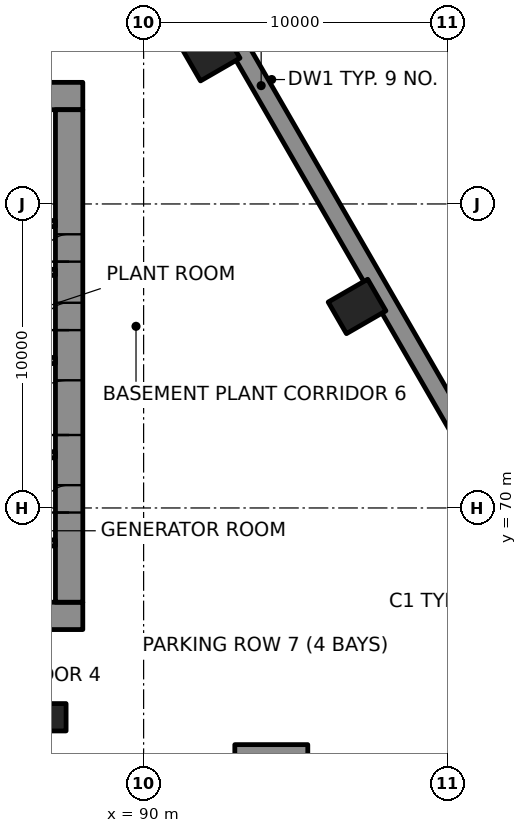
"""IFC4 building model, lengths in metres.
Left out: names, types, materials, properties, quantities, classifications, styles, units other than length and angle.
Written with IfcOpenShell. Run it as: python <this file> out.ifc"""

import sys

from ifc_helpers import new_model, si_unit, direction, frame, frame_2d, origin, origin_2d, place, context, subcontext, project, spatial, polyline, rectangle, outline, extrude, element, fill, save


model = new_model("IFC4")
c1 = context("Model", 3, precision=1e-05, world=origin(), true_north=direction((0.0, 1.0)))
c2 = subcontext(c1, "Body", "Model", "MODEL_VIEW")
j1 = project(units=[si_unit("LENGTHUNIT", "METRE"), si_unit("PLANEANGLEUNIT", "RADIAN")], contexts=[c1])
p1 = place(None, origin())
s1 = spatial("IfcSite", under=j1, at=p1, CompositionType="ELEMENT")
p2 = place(p1, origin())
s2 = spatial("IfcBuilding", under=s1, at=p2, CompositionType="ELEMENT")
p3 = place(p2, frame((0.0, 0.0, -14.0)))
s3 = spatial("IfcBuildingStorey", under=s2, at=p3, CompositionType="ELEMENT", Elevation=-14.0)
p4 = place(p3, frame((109.132, 57.451, -0.35), z_axis=(0.0, 0.0, 1.0), x_axis=(-0.499999206999, 0.866025861623, 0.0)))
e1 = element("IfcWall", 1, at=p4, inside=s3, PredefinedType="SOLIDWALL", context=c2, shape_type="SweptSolid", body=[
    extrude(rectangle(XDim=61.064, YDim=0.6, at=frame_2d((30.532, 0.0))), origin(), (0.0, 0.0, 1.0), 4.5),
])
p5 = place(p3, frame((0.0, 0.0, -14.5)))
e2 = element("IfcWall", 2, at=p5, inside=s3, PredefinedType="SOLIDWALL", context=c2, shape_type="SweptSolid", body=[
    extrude(outline(polyline([(109.132, 57.451), (78.6, 110.334), (79.062, 111.134), (110.056, 57.451), (109.132, 57.451)])), origin(), (0.0, 0.0, 1.0), 14.15),
])
p6 = place(p3, frame((94.2, 54.215, -0.35), z_axis=(0.0, 0.0, 1.0), x_axis=(0.0, 1.0, 0.0)))
e3 = element("IfcWall", 3, at=p6, inside=s3, PredefinedType="SHEAR", context=c2, shape_type="SweptSolid", body=[
    extrude(rectangle(XDim=8.0, YDim=2.4, at=frame_2d((4.0, 0.0))), origin(), (0.0, 0.0, 1.0), 4.5),
])
for number, where, z_axis, x_axis in (
    (4, (97.021, 76.628, -0.35), (0.0, 0.0, 1.0), (-0.5, 0.866, 0.0)),
    (5, (92.22, 84.942, -0.35), (0.0, 0.0, 1.0), (-0.5, 0.866, 0.0)),
):
    element("IfcColumn", number, at=place(p3, frame(where, z_axis=z_axis, x_axis=x_axis)), inside=s3, PredefinedType="COLUMN", context=c2, shape_type="SweptSolid", body=[
        extrude(rectangle(XDim=1.2, YDim=1.5, at=origin_2d()), origin(), (0.0, 0.0, 1.0), 4.85),
    ])
p7 = place(p3, frame((87.0, 63.115, -0.35), z_axis=(0.0, 0.0, 1.0), x_axis=(1.0, 0.0, 0.0)))
e6 = element("IfcColumn", 6, at=p7, inside=s3, PredefinedType="COLUMN", context=c2, shape_type="SweptSolid", body=[
    extrude(rectangle(XDim=0.9, YDim=0.9, at=origin_2d()), origin(), (0.0, 0.0, 1.0), 4.85),
])
p8 = place(p3, frame((62.0, 66.45, -0.35), z_axis=(0.0, 0.0, 1.0), x_axis=(1.0, 0.0, 0.0)))
e7 = element("IfcWall", 7, at=p8, inside=s3, PredefinedType="SHEAR", context=c2, shape_type="SweptSolid", body=[
    extrude(rectangle(XDim=26.0, YDim=0.9, at=frame_2d((13.0, 0.0))), origin(), (0.0, 0.0, 1.0), 4.5),
])
p9 = place(p8, frame((3.45, 0.0, 0.35)))
e8 = element("IfcOpeningElement", 8, at=p9, cuts=e7, PredefinedType="OPENING", context=c2, shape_type="SweptSolid", body=[
    extrude(rectangle(XDim=0.9, YDim=2.1, at=frame_2d((0.45, 1.05))), frame((0.0, 0.46, 0.0), z_axis=(0.0, -1.0, 0.0), x_axis=(1.0, 0.0, 0.0)), (0.0, 0.0, 1.0), 0.92),
])
p10 = place(p8, frame((5.637, 0.0, 0.35)))
e9 = element("IfcOpeningElement", 9, at=p10, cuts=e7, PredefinedType="OPENING", context=c2, shape_type="SweptSolid", body=[
    extrude(rectangle(XDim=0.9, YDim=2.1, at=frame_2d((0.45, 1.05))), frame((0.0, 0.46, 0.0), z_axis=(0.0, -1.0, 0.0), x_axis=(1.0, 0.0, 0.0)), (0.0, 0.0, 1.0), 0.92),
])
p11 = place(p8, frame((7.212, 0.0, 0.35)))
e10 = element("IfcOpeningElement", 10, at=p11, cuts=e7, PredefinedType="OPENING", context=c2, shape_type="SweptSolid", body=[
    extrude(rectangle(XDim=0.9, YDim=2.1, at=frame_2d((0.45, 1.05))), frame((0.0, 0.46, 0.0), z_axis=(0.0, -1.0, 0.0), x_axis=(1.0, 0.0, 0.0)), (0.0, 0.0, 1.0), 0.92),
])
p12 = place(p8, frame((8.999, 0.0, 0.35)))
e11 = element("IfcOpeningElement", 11, at=p12, cuts=e7, PredefinedType="OPENING", context=c2, shape_type="SweptSolid", body=[
    extrude(rectangle(XDim=0.9, YDim=2.1, at=frame_2d((0.45, 1.05))), frame((0.0, 0.46, 0.0), z_axis=(0.0, -1.0, 0.0), x_axis=(1.0, 0.0, 0.0)), (0.0, 0.0, 1.0), 0.92),
])
p13 = place(p8, frame((17.324, 0.0, 0.35)))
e12 = element("IfcOpeningElement", 12, at=p13, cuts=e7, PredefinedType="OPENING", context=c2, shape_type="SweptSolid", body=[
    extrude(rectangle(XDim=0.9, YDim=2.1, at=frame_2d((0.45, 1.05))), frame((0.0, 0.46, 0.0), z_axis=(0.0, -1.0, 0.0), x_axis=(1.0, 0.0, 0.0)), (0.0, 0.0, 1.0), 0.92),
])
p14 = place(p3, frame((62.0, 83.55, -0.35), z_axis=(0.0, 0.0, 1.0), x_axis=(1.0, 0.0, 0.0)))
e13 = element("IfcWall", 13, at=p14, inside=s3, PredefinedType="SHEAR", context=c2, shape_type="SweptSolid", body=[
    extrude(rectangle(XDim=26.0, YDim=0.9, at=frame_2d((13.0, 0.0))), origin(), (0.0, 0.0, 1.0), 4.5),
])
p15 = place(p14, frame((5.695, 0.0, 0.35)))
e14 = element("IfcOpeningElement", 14, at=p15, cuts=e13, PredefinedType="OPENING", context=c2, shape_type="SweptSolid", body=[
    extrude(rectangle(XDim=1.0, YDim=2.1, at=frame_2d((0.5, 1.05))), frame((0.0, 0.46, 0.0), z_axis=(0.0, -1.0, 0.0), x_axis=(1.0, 0.0, 0.0)), (0.0, 0.0, 1.0), 0.92),
])
p16 = place(p14, frame((19.505, 0.0, 0.35)))
e15 = element("IfcOpeningElement", 15, at=p16, cuts=e13, PredefinedType="OPENING", context=c2, shape_type="SweptSolid", body=[
    extrude(rectangle(XDim=1.0, YDim=2.1, at=frame_2d((0.5, 1.05))), frame((0.0, 0.46, 0.0), z_axis=(0.0, -1.0, 0.0), x_axis=(1.0, 0.0, 0.0)), (0.0, 0.0, 1.0), 0.92),
])
p17 = place(p14, frame((3.45, 0.0, 0.35)))
e16 = element("IfcOpeningElement", 16, at=p17, cuts=e13, PredefinedType="OPENING", context=c2, shape_type="SweptSolid", body=[
    extrude(rectangle(XDim=0.9, YDim=2.1, at=frame_2d((0.45, 1.05))), frame((0.0, 0.46, 0.0), z_axis=(0.0, -1.0, 0.0), x_axis=(1.0, 0.0, 0.0)), (0.0, 0.0, 1.0), 0.92),
])
p18 = place(p14, frame((12.65, 0.0, 0.35)))
e17 = element("IfcOpeningElement", 17, at=p18, cuts=e13, PredefinedType="OPENING", context=c2, shape_type="SweptSolid", body=[
    extrude(rectangle(XDim=0.9, YDim=2.1, at=frame_2d((0.45, 1.05))), frame((0.0, 0.46, 0.0), z_axis=(0.0, -1.0, 0.0), x_axis=(1.0, 0.0, 0.0)), (0.0, 0.0, 1.0), 0.92),
])
p19 = place(p14, frame((22.55, 0.0, 0.35)))
e18 = element("IfcOpeningElement", 18, at=p19, cuts=e13, PredefinedType="OPENING", context=c2, shape_type="SweptSolid", body=[
    extrude(rectangle(XDim=0.9, YDim=2.1, at=frame_2d((0.45, 1.05))), frame((0.0, 0.46, 0.0), z_axis=(0.0, -1.0, 0.0), x_axis=(1.0, 0.0, 0.0)), (0.0, 0.0, 1.0), 0.92),
])
p20 = place(p3, frame((87.55, 66.9, -0.35), z_axis=(0.0, 0.0, 1.0), x_axis=(0.0, 1.0, 0.0)))
e19 = element("IfcWall", 19, at=p20, inside=s3, PredefinedType="SHEAR", context=c2, shape_type="SweptSolid", body=[
    extrude(rectangle(XDim=16.2, YDim=0.9, at=frame_2d((8.1, 0.0))), origin(), (0.0, 0.0, 1.0), 4.5),
])
p21 = place(p20, frame((5.5, 0.0, 0.35)))
e20 = element("IfcOpeningElement", 20, at=p21, cuts=e19, PredefinedType="OPENING", context=c2, shape_type="SweptSolid", body=[
    extrude(rectangle(XDim=1.8, YDim=2.1, at=frame_2d((0.9, 1.05))), frame((0.0, 0.46, 0.0), z_axis=(0.0, -1.0, 0.0), x_axis=(1.0, 0.0, 0.0)), (0.0, 0.0, 1.0), 0.92),
])
p22 = place(p20, frame((2.95, 0.0, 0.35)))
e21 = element("IfcOpeningElement", 21, at=p22, cuts=e19, PredefinedType="OPENING", context=c2, shape_type="SweptSolid", body=[
    extrude(rectangle(XDim=0.9, YDim=2.1, at=frame_2d((0.45, 1.05))), frame((0.0, 0.46, 0.0), z_axis=(0.0, -1.0, 0.0), x_axis=(1.0, 0.0, 0.0)), (0.0, 0.0, 1.0), 0.92),
])
p23 = place(p20, frame((8.95, 0.0, 0.35)))
e22 = element("IfcOpeningElement", 22, at=p23, cuts=e19, PredefinedType="OPENING", context=c2, shape_type="SweptSolid", body=[
    extrude(rectangle(XDim=0.9, YDim=2.1, at=frame_2d((0.45, 1.05))), frame((0.0, 0.46, 0.0), z_axis=(0.0, -1.0, 0.0), x_axis=(1.0, 0.0, 0.0)), (0.0, 0.0, 1.0), 0.92),
])
p24 = place(p20, frame((11.202, 0.0, 0.35)))
e23 = element("IfcOpeningElement", 23, at=p24, cuts=e19, PredefinedType="OPENING", context=c2, shape_type="SweptSolid", body=[
    extrude(rectangle(XDim=0.9, YDim=2.1, at=frame_2d((0.45, 1.05))), frame((0.0, 0.46, 0.0), z_axis=(0.0, -1.0, 0.0), x_axis=(1.0, 0.0, 0.0)), (0.0, 0.0, 1.0), 0.92),
])
p25 = place(p3, frame((73.4, 68.85, 0.0), z_axis=(0.0, 0.0, 1.0), x_axis=(1.0, 0.0, 0.0)))
e24 = element("IfcWall", 24, at=p25, inside=s3, PredefinedType="PARTITIONING", context=c2, shape_type="SweptSolid", body=[
    extrude(rectangle(XDim=13.7, YDim=0.2, at=frame_2d((6.85, 0.0))), origin(), (0.0, 0.0, 1.0), 4.15),
])
p26 = place(p3, frame((73.35, 71.75, 0.0), z_axis=(0.0, 0.0, 1.0), x_axis=(1.0, 0.0, 0.0)))
e25 = element("IfcWall", 25, at=p26, inside=s3, PredefinedType="PARTITIONING", context=c2, shape_type="SweptSolid", body=[
    extrude(rectangle(XDim=13.75, YDim=0.2, at=frame_2d((6.875, 0.0))), origin(), (0.0, 0.0, 1.0), 4.15),
])
p27 = place(p26, frame((2.25, 0.0, 0.0)))
e26 = element("IfcOpeningElement", 26, at=p27, cuts=e25, PredefinedType="OPENING", context=c2, shape_type="SweptSolid", body=[
    extrude(rectangle(XDim=0.9, YDim=2.1, at=frame_2d((0.45, 1.05))), frame((0.0, 0.11, 0.0), z_axis=(0.0, -1.0, 0.0), x_axis=(1.0, 0.0, 0.0)), (0.0, 0.0, 1.0), 0.22),
])
p28 = place(p26, frame((7.85, 0.0, 0.0)))
e27 = element("IfcOpeningElement", 27, at=p28, cuts=e25, PredefinedType="OPENING", context=c2, shape_type="SweptSolid", body=[
    extrude(rectangle(XDim=0.9, YDim=2.1, at=frame_2d((0.45, 1.05))), frame((0.0, 0.11, 0.0), z_axis=(0.0, -1.0, 0.0), x_axis=(1.0, 0.0, 0.0)), (0.0, 0.0, 1.0), 0.22),
])
p29 = place(p3, frame((73.35, 74.85, 0.0), z_axis=(0.0, 0.0, 1.0), x_axis=(1.0, 0.0, 0.0)))
e28 = element("IfcWall", 28, at=p29, inside=s3, PredefinedType="PARTITIONING", context=c2, shape_type="SweptSolid", body=[
    extrude(rectangle(XDim=13.75, YDim=0.2, at=frame_2d((6.875, 0.0))), origin(), (0.0, 0.0, 1.0), 4.15),
])
p30 = place(p29, frame((2.25, 0.0, 0.0)))
e29 = element("IfcOpeningElement", 29, at=p30, cuts=e28, PredefinedType="OPENING", context=c2, shape_type="SweptSolid", body=[
    extrude(rectangle(XDim=0.9, YDim=2.1, at=frame_2d((0.45, 1.05))), frame((0.0, 0.11, 0.0), z_axis=(0.0, -1.0, 0.0), x_axis=(1.0, 0.0, 0.0)), (0.0, 0.0, 1.0), 0.22),
])
p31 = place(p29, frame((7.85, 0.0, 0.0)))
e30 = element("IfcOpeningElement", 30, at=p31, cuts=e28, PredefinedType="OPENING", context=c2, shape_type="SweptSolid", body=[
    extrude(rectangle(XDim=0.9, YDim=2.1, at=frame_2d((0.45, 1.05))), frame((0.0, 0.11, 0.0), z_axis=(0.0, -1.0, 0.0), x_axis=(1.0, 0.0, 0.0)), (0.0, 0.0, 1.0), 0.22),
])
for number, where, z_axis, x_axis in (
    (31, (83.05, 77.75, 0.0), (0.0, 0.0, 1.0), (1.0, 0.0, 0.0)),
    (32, (83.05, 79.355, 0.0), (0.0, 0.0, 1.0), (1.0, 0.0, 0.0)),
):
    element("IfcWall", number, at=place(p3, frame(where, z_axis=z_axis, x_axis=x_axis)), inside=s3, PredefinedType="PARTITIONING", context=c2, shape_type="SweptSolid", body=[
        extrude(rectangle(XDim=4.05, YDim=0.2, at=frame_2d((2.025, 0.0))), origin(), (0.0, 0.0, 1.0), 4.15),
    ])
p32 = place(p21, origin())
e33 = element("IfcDoor", 33, at=p32, inside=s3, OperationType="SINGLE_SWING_RIGHT", PredefinedType="DOOR", context=c2, shape_type="SweptSolid", body=[
    extrude(rectangle(XDim=1.8, YDim=2.1, at=frame_2d((0.9, 1.05))), frame((0.0, 0.17, 0.0), z_axis=(0.0, -1.0, 0.0), x_axis=(1.0, 0.0, 0.0)), (0.0, 0.0, 1.0), 0.34),
])
fill(e20, e33)
p33 = place(p22, origin())
e34 = element("IfcDoor", 34, at=p33, inside=s3, OperationType="SINGLE_SWING_RIGHT", PredefinedType="DOOR", context=c2, shape_type="SweptSolid", body=[
    extrude(rectangle(XDim=0.9, YDim=2.1, at=frame_2d((0.45, 1.05))), frame((0.0, 0.17, 0.0), z_axis=(0.0, -1.0, 0.0), x_axis=(1.0, 0.0, 0.0)), (0.0, 0.0, 1.0), 0.34),
])
fill(e21, e34)
p34 = place(p23, origin())
e35 = element("IfcDoor", 35, at=p34, inside=s3, OperationType="SINGLE_SWING_RIGHT", PredefinedType="DOOR", context=c2, shape_type="SweptSolid", body=[
    extrude(rectangle(XDim=0.9, YDim=2.1, at=frame_2d((0.45, 1.05))), frame((0.0, 0.17, 0.0), z_axis=(0.0, -1.0, 0.0), x_axis=(1.0, 0.0, 0.0)), (0.0, 0.0, 1.0), 0.34),
])
fill(e22, e35)
p35 = place(p24, origin())
e36 = element("IfcDoor", 36, at=p35, inside=s3, OperationType="SINGLE_SWING_RIGHT", PredefinedType="DOOR", context=c2, shape_type="SweptSolid", body=[
    extrude(rectangle(XDim=0.9, YDim=2.1, at=frame_2d((0.45, 1.05))), frame((0.0, 0.17, 0.0), z_axis=(0.0, -1.0, 0.0), x_axis=(1.0, 0.0, 0.0)), (0.0, 0.0, 1.0), 0.34),
])
fill(e23, e36)
save(model, sys.argv[1])
